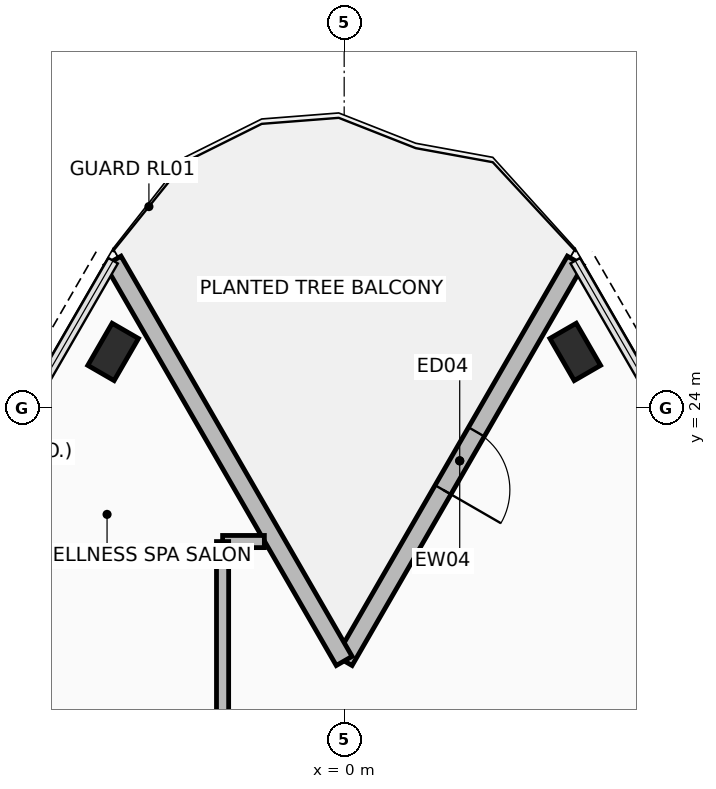
"""IFC4 building model, lengths in metres.
Left out: names, types, materials, properties, quantities, classifications, styles, units other than length and angle.
Written with IfcOpenShell. Run it as: python <this file> out.ifc"""

import sys

from ifc_helpers import new_model, si_unit, direction, frame, frame_2d, origin, origin_2d, place, context, subcontext, project, spatial, rectangle, hollow_rectangle, extrude, element, fill, save


model = new_model("IFC4")
c1 = context("Model", 3, precision=1e-05, world=origin(), true_north=direction((0.0, 1.0)))
c2 = subcontext(c1, "Body", "Model", "MODEL_VIEW")
j1 = project(units=[si_unit("LENGTHUNIT", "METRE"), si_unit("PLANEANGLEUNIT", "RADIAN")], contexts=[c1])
p1 = place(None, origin())
s1 = spatial("IfcSite", under=j1, at=p1, CompositionType="ELEMENT")
p2 = place(p1, origin())
s2 = spatial("IfcBuilding", under=s1, at=p2, CompositionType="ELEMENT")
p3 = place(p2, frame((0.0, 0.0, 48.85)))
s3 = spatial("IfcBuildingStorey", under=s2, at=p3, CompositionType="ELEMENT", Elevation=48.85)
for number, where, z_axis, x_axis in (
    (1, (-3.8, 24.918, 0.0), (0.0, 0.0, 1.0), (0.5, 0.866, 0.0)),
    (2, (3.8, 24.918, 0.0), (0.0, 0.0, 1.0), (-0.5, 0.866, 0.0)),
):
    element("IfcColumn", number, at=place(p3, frame(where, z_axis=z_axis, x_axis=x_axis)), inside=s3, PredefinedType="COLUMN", context=c2, shape_type="SweptSolid", body=[
        extrude(hollow_rectangle(XDim=0.5, YDim=0.8, WallThickness=0.04, at=origin_2d()), origin(), (0.0, 0.0, 1.0), 3.4),
    ])
p4 = place(p3, frame((3.8, 26.418, 0.0), z_axis=(0.0, 0.0, 1.0), x_axis=(-0.500005158081, -0.866022425744, 0.0)))
e3 = element("IfcWall", 3, at=p4, inside=s3, PredefinedType="STANDARD", context=c2, shape_type="SweptSolid", body=[
    extrude(rectangle(XDim=7.6, YDim=0.3, at=frame_2d((3.8, 0.0))), origin(), (0.0, 0.0, 1.0), 2.42),
])
p5 = place(p4, frame((3.25, 0.0, 0.0)))
e4 = element("IfcOpeningElement", 4, at=p5, cuts=e3, PredefinedType="OPENING", context=c2, shape_type="SweptSolid", body=[
    extrude(rectangle(XDim=1.1, YDim=2.2, at=frame_2d((0.55, 1.1))), frame((0.0, 0.16, 0.0), z_axis=(0.0, -1.0, 0.0), x_axis=(1.0, 0.0, 0.0)), (0.0, 0.0, 1.0), 0.32),
])
p6 = place(p3, frame((0.0, 19.836, 0.0), z_axis=(0.0, 0.0, 1.0), x_axis=(-0.500005158081, 0.866022425744, 0.0)))
e5 = element("IfcWall", 5, at=p6, inside=s3, PredefinedType="STANDARD", context=c2, shape_type="SweptSolid", body=[
    extrude(rectangle(XDim=7.6, YDim=0.3, at=frame_2d((3.8, 0.0))), origin(), (0.0, 0.0, 1.0), 2.42),
])
p7 = place(p3, frame((2.843, 10.612, 0.0), z_axis=(0.0, 0.0, 1.0), x_axis=(0.258820414837, 0.965925459269, 0.0)))
e6 = element("IfcWall", 6, at=p7, inside=s3, PredefinedType="PARTITIONING", context=c2, shape_type="SweptSolid", body=[
    extrude(rectangle(XDim=12.348, YDim=0.2, at=frame_2d((6.174, 0.0))), origin(), (0.0, 0.0, 1.0), 2.42),
])
p8 = place(p3, frame((-1.313, 21.8, 0.0), z_axis=(0.0, 0.0, 1.0), x_axis=(-1.0, 0.0, 0.0)))
e7 = element("IfcWall", 7, at=p8, inside=s3, PredefinedType="PARTITIONING", context=c2, shape_type="SweptSolid", body=[
    extrude(rectangle(XDim=0.687, YDim=0.2, at=frame_2d((0.343, 0.0))), origin(), (0.0, 0.0, 1.0), 3.225),
])
p9 = place(p3, frame((-2.0, 21.799, 0.0), z_axis=(0.0, 0.0, 1.0), x_axis=(0.0, -1.0, 0.0)))
e8 = element("IfcWall", 8, at=p9, inside=s3, PredefinedType="PARTITIONING", context=c2, shape_type="SweptSolid", body=[
    extrude(rectangle(XDim=11.194, YDim=0.2, at=frame_2d((5.597, 0.0))), origin(), (0.0, 0.0, 1.0), 3.225),
])
p10 = place(p9, frame((4.997, 0.0, 0.0)))
e9 = element("IfcOpeningElement", 9, at=p10, cuts=e8, PredefinedType="OPENING", context=c2, shape_type="SweptSolid", body=[
    extrude(rectangle(XDim=1.2, YDim=2.15, at=frame_2d((0.6, 1.075))), frame((0.0, 0.11, 0.0), z_axis=(0.0, -1.0, 0.0), x_axis=(1.0, 0.0, 0.0)), (0.0, 0.0, 1.0), 0.22),
])
p11 = place(p3, frame((-2.84, 10.598, 0.0), z_axis=(0.0, 0.0, 1.0), x_axis=(-0.258811500911, 0.965927847718, 0.0)))
e10 = element("IfcWall", 10, at=p11, inside=s3, PredefinedType="PARTITIONING", context=c2, shape_type="SweptSolid", body=[
    extrude(rectangle(XDim=12.352, YDim=0.2, at=frame_2d((6.176, 0.0))), origin(), (0.0, 0.0, 1.0), 2.42),
])
p12 = place(p5, frame((1.1, 0.0, 0.0), z_axis=(0.0, 0.0, 1.0), x_axis=(-1.0, 0.0, 0.0)))
e11 = element("IfcDoor", 11, at=p12, inside=s3, OperationType="SINGLE_SWING_LEFT", PredefinedType="DOOR", context=c2, shape_type="SweptSolid", body=[
    extrude(rectangle(XDim=1.1, YDim=2.2, at=frame_2d((0.55, 1.1))), frame((0.0, 0.025, 0.0), z_axis=(0.0, -1.0, 0.0), x_axis=(1.0, 0.0, 0.0)), (0.0, 0.0, 1.0), 0.05),
])
fill(e4, e11)
save(model, sys.argv[1])
